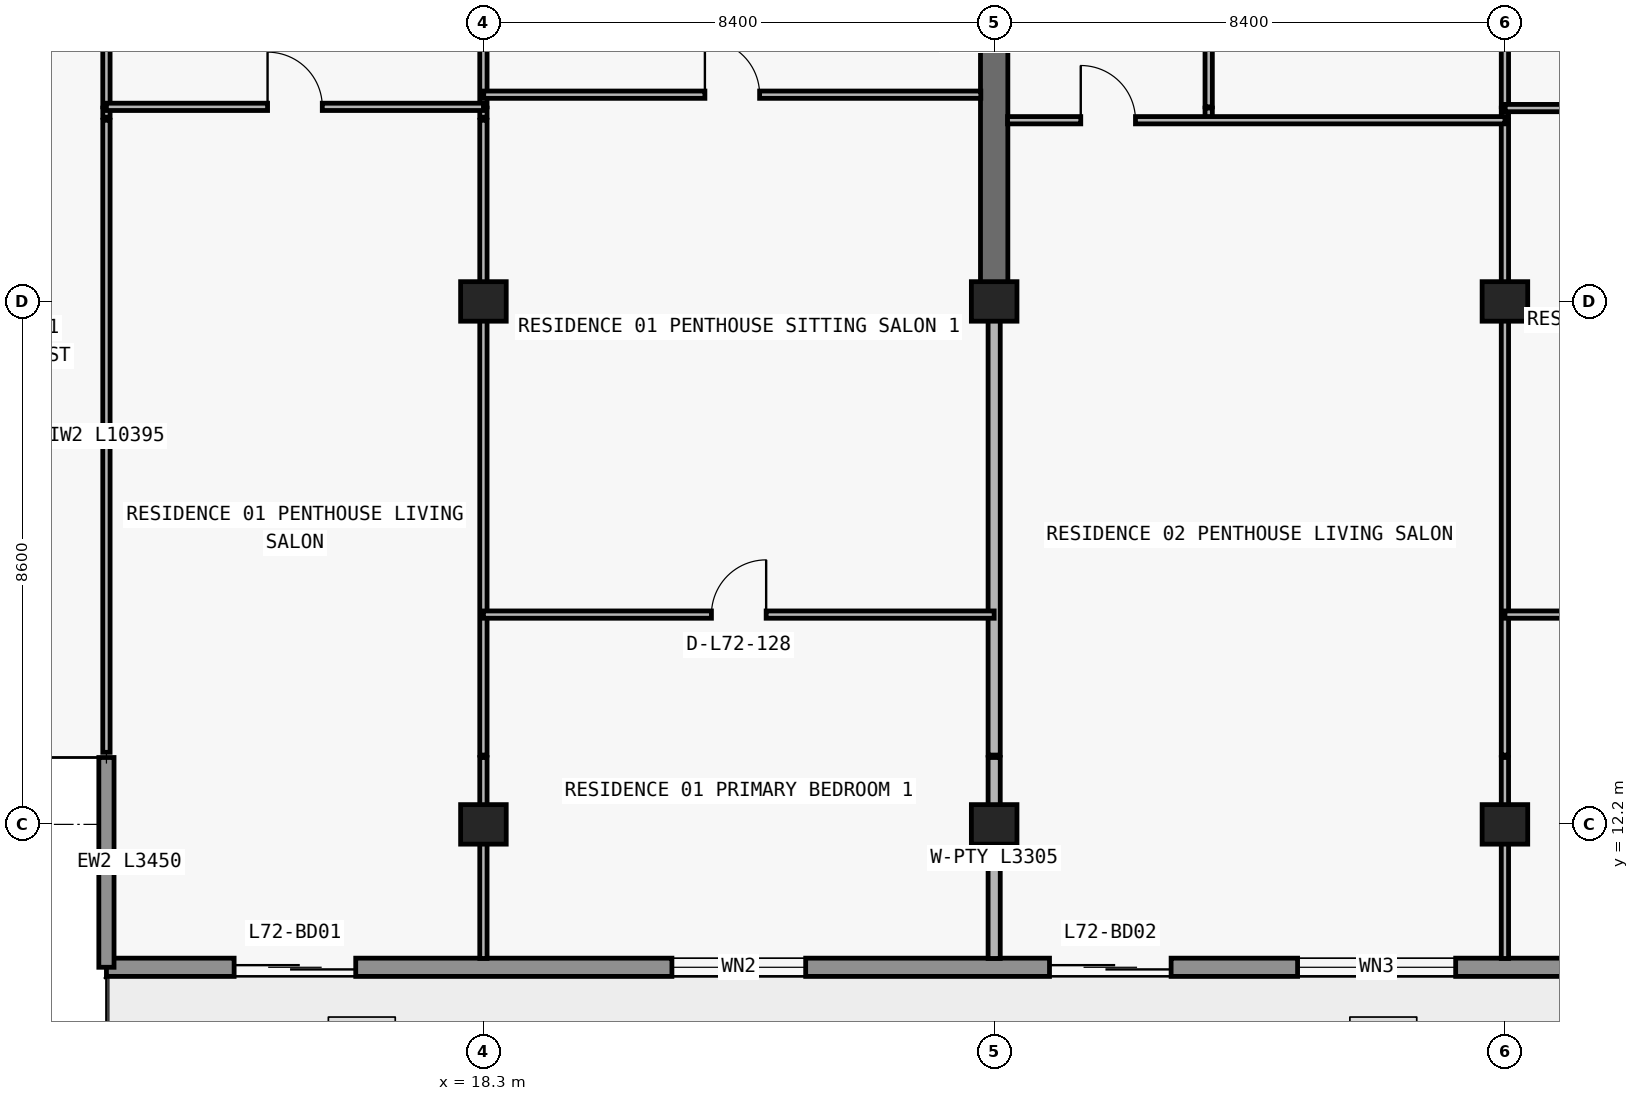
"""IFC4 building model, lengths in metres.
Left out: names, types, materials, properties, quantities, classifications, styles, units other than length and angle.
Written with IfcOpenShell. Run it as: python <this file> out.ifc"""

import sys

from ifc_helpers import new_model, si_unit, direction, frame, frame_2d, origin, origin_2d, place, context, subcontext, project, spatial, rectangle, extrude, element, fill, save


model = new_model("IFC4")
c1 = context("Model", 3, precision=1e-05, world=origin(), true_north=direction((0.0, 1.0)))
c2 = subcontext(c1, "Body", "Model", "MODEL_VIEW")
j1 = project(units=[si_unit("LENGTHUNIT", "METRE"), si_unit("PLANEANGLEUNIT", "RADIAN")], contexts=[c1])
p1 = place(None, origin())
s1 = spatial("IfcSite", under=j1, at=p1, CompositionType="ELEMENT")
p2 = place(p1, origin())
s2 = spatial("IfcBuilding", under=s1, at=p2, CompositionType="ELEMENT")
p3 = place(p2, frame((0.0, 0.0, 256.2)))
s3 = spatial("IfcBuildingStorey", under=s2, at=p3, CompositionType="ELEMENT", Elevation=256.2)
for number, where, z_axis, x_axis in (
    (1, (18.3, 12.2, 0.0), (0.0, 0.0, 1.0), (1.0, 0.0, 0.0)),
    (2, (26.7, 12.2, 0.0), (0.0, 0.0, 1.0), (1.0, 0.0, 0.0)),
    (3, (35.1, 12.2, 0.0), (0.0, 0.0, 1.0), (1.0, 0.0, 0.0)),
    (4, (18.3, 20.8, 0.0), (0.0, 0.0, 1.0), (1.0, 0.0, 0.0)),
    (5, (26.7, 20.8, 0.0), (0.0, 0.0, 1.0), (1.0, 0.0, 0.0)),
    (6, (35.1, 20.8, 0.0), (0.0, 0.0, 1.0), (1.0, 0.0, 0.0)),
):
    element("IfcColumn", number, at=place(p3, frame(where, z_axis=z_axis, x_axis=x_axis)), inside=s3, PredefinedType="COLUMN", context=c2, shape_type="SweptSolid", body=[
        extrude(rectangle(XDim=0.75, YDim=0.65, at=origin_2d()), origin(), (0.0, 0.0, 1.0), 3.05),
    ])
p4 = place(p3, frame((26.7, 20.8, 0.0), z_axis=(0.0, 0.0, 1.0), x_axis=(0.0, 1.0, 0.0)))
e7 = element("IfcWall", 7, at=p4, inside=s3, PredefinedType="SHEAR", context=c2, shape_type="SweptSolid", body=[
    extrude(rectangle(XDim=8.6, YDim=0.45, at=frame_2d((4.3, 0.0))), origin(), (0.0, 0.0, 1.0), 3.05),
])
p5 = place(p3, frame((65.7, 9.85, 0.0), z_axis=(0.0, 0.0, 1.0), x_axis=(-1.0, 0.0, 0.0)))
e8 = element("IfcWall", 8, at=p5, inside=s3, PredefinedType="STANDARD", context=c2, shape_type="SweptSolid", body=[
    extrude(rectangle(XDim=53.6, YDim=0.3, at=frame_2d((26.8, 0.0))), origin(), (0.0, 0.0, 1.0), 3.05),
])
p6 = place(p5, frame((49.5, 0.0, 0.0)))
e9 = element("IfcOpeningElement", 9, at=p6, cuts=e8, PredefinedType="OPENING", context=c2, shape_type="SweptSolid", body=[
    extrude(rectangle(XDim=2.0, YDim=2.3, at=frame_2d((1.0, 1.15))), frame((0.0, 0.16, 0.0), z_axis=(0.0, -1.0, 0.0), x_axis=(1.0, 0.0, 0.0)), (0.0, 0.0, 1.0), 0.32),
])
p7 = place(p5, frame((42.1, 0.0, 0.85)))
e10 = element("IfcOpeningElement", 10, at=p7, cuts=e8, PredefinedType="OPENING", context=c2, shape_type="SweptSolid", body=[
    extrude(rectangle(XDim=2.2, YDim=1.55, at=frame_2d((1.1, 0.775))), frame((0.0, 0.16, 0.0), z_axis=(0.0, -1.0, 0.0), x_axis=(1.0, 0.0, 0.0)), (0.0, 0.0, 1.0), 0.32),
])
p8 = place(p5, frame((36.09, 0.0, 0.0)))
e11 = element("IfcOpeningElement", 11, at=p8, cuts=e8, PredefinedType="OPENING", context=c2, shape_type="SweptSolid", body=[
    extrude(rectangle(XDim=2.0, YDim=2.3, at=frame_2d((1.0, 1.15))), frame((0.0, 0.16, 0.0), z_axis=(0.0, -1.0, 0.0), x_axis=(1.0, 0.0, 0.0)), (0.0, 0.0, 1.0), 0.32),
])
p9 = place(p5, frame((31.41, 0.0, 0.65)))
e12 = element("IfcOpeningElement", 12, at=p9, cuts=e8, PredefinedType="OPENING", context=c2, shape_type="SweptSolid", body=[
    extrude(rectangle(XDim=2.6, YDim=1.85, at=frame_2d((1.3, 0.925))), frame((0.0, 0.16, 0.0), z_axis=(0.0, -1.0, 0.0), x_axis=(1.0, 0.0, 0.0)), (0.0, 0.0, 1.0), 0.32),
])
p10 = place(p5, frame((25.7, 0.0, 0.85)))
e13 = element("IfcOpeningElement", 13, at=p10, cuts=e8, PredefinedType="OPENING", context=c2, shape_type="SweptSolid", body=[
    extrude(rectangle(XDim=2.2, YDim=1.55, at=frame_2d((1.1, 0.775))), frame((0.0, 0.16, 0.0), z_axis=(0.0, -1.0, 0.0), x_axis=(1.0, 0.0, 0.0)), (0.0, 0.0, 1.0), 0.32),
])
p11 = place(p5, frame((17.7, 0.0, 0.85)))
e14 = element("IfcOpeningElement", 14, at=p11, cuts=e8, PredefinedType="OPENING", context=c2, shape_type="SweptSolid", body=[
    extrude(rectangle(XDim=2.2, YDim=1.55, at=frame_2d((1.1, 0.775))), frame((0.0, 0.16, 0.0), z_axis=(0.0, -1.0, 0.0), x_axis=(1.0, 0.0, 0.0)), (0.0, 0.0, 1.0), 0.32),
])
p12 = place(p5, frame((11.626, 0.0, 0.0)))
e15 = element("IfcOpeningElement", 15, at=p12, cuts=e8, PredefinedType="OPENING", context=c2, shape_type="SweptSolid", body=[
    extrude(rectangle(XDim=2.0, YDim=2.3, at=frame_2d((1.0, 1.15))), frame((0.0, 0.16, 0.0), z_axis=(0.0, -1.0, 0.0), x_axis=(1.0, 0.0, 0.0)), (0.0, 0.0, 1.0), 0.32),
])
p13 = place(p5, frame((7.326, 0.0, 0.85)))
e16 = element("IfcOpeningElement", 16, at=p13, cuts=e8, PredefinedType="OPENING", context=c2, shape_type="SweptSolid", body=[
    extrude(rectangle(XDim=2.2, YDim=1.55, at=frame_2d((1.1, 0.775))), frame((0.0, 0.16, 0.0), z_axis=(0.0, -1.0, 0.0), x_axis=(1.0, 0.0, 0.0)), (0.0, 0.0, 1.0), 0.32),
])
p14 = place(p3, frame((12.1, 13.3, 0.0), z_axis=(0.0, 0.0, 1.0), x_axis=(0.0, -1.0, 0.0)))
e17 = element("IfcWall", 17, at=p14, inside=s3, PredefinedType="ELEMENTEDWALL", context=c2, shape_type="SweptSolid", body=[
    extrude(rectangle(XDim=3.45, YDim=0.25, at=frame_2d((1.725, 0.0))), origin(), (0.0, 0.0, 1.0), 3.05),
])
p15 = place(p3, frame((12.1, 13.385, 0.0), z_axis=(0.0, 0.0, 1.0), x_axis=(0.0, 1.0, 0.0)))
e18 = element("IfcWall", 18, at=p15, inside=s3, PredefinedType="PARTITIONING", context=c2, shape_type="SweptSolid", body=[
    extrude(rectangle(XDim=10.395, YDim=0.12, at=frame_2d((5.198, 0.0))), origin(), (0.0, 0.0, 1.0), 3.05),
])
p16 = place(p3, frame((12.1, 23.83, 0.0), z_axis=(0.0, 0.0, 1.0), x_axis=(0.0, 1.0, 0.0)))
e19 = element("IfcWall", 19, at=p16, inside=s3, PredefinedType="PARTITIONING", context=c2, shape_type="SweptSolid", body=[
    extrude(rectangle(XDim=0.15, YDim=0.12, at=frame_2d((0.075, 0.0))), origin(), (0.0, 0.0, 1.0), 3.05),
])
p17 = place(p3, frame((12.1, 24.0, 0.0), z_axis=(0.0, 0.0, 1.0), x_axis=(0.0, 1.0, 0.0)))
e20 = element("IfcWall", 20, at=p17, inside=s3, PredefinedType="PARTITIONING", context=c2, shape_type="SweptSolid", body=[
    extrude(rectangle(XDim=4.58, YDim=0.12, at=frame_2d((2.29, 0.0))), origin(), (0.0, 0.0, 1.0), 3.05),
])
p18 = place(p17, frame((1.84, 0.0, 0.0)))
e21 = element("IfcOpeningElement", 21, at=p18, cuts=e20, PredefinedType="OPENING", context=c2, shape_type="SweptSolid", body=[
    extrude(rectangle(XDim=0.9, YDim=2.15, at=frame_2d((0.45, 1.075))), frame((0.0, 0.07, 0.0), z_axis=(0.0, -1.0, 0.0), x_axis=(1.0, 0.0, 0.0)), (0.0, 0.0, 1.0), 0.14),
])
p19 = place(p3, frame((18.3, 9.995, 0.0), z_axis=(0.0, 0.0, 1.0), x_axis=(0.0, 1.0, 0.0)))
e22 = element("IfcWall", 22, at=p19, inside=s3, PredefinedType="PARTITIONING", context=c2, shape_type="SweptSolid", body=[
    extrude(rectangle(XDim=3.305, YDim=0.12, at=frame_2d((1.652, 0.0))), origin(), (0.0, 0.0, 1.0), 2.263),
])
p20 = place(p3, frame((18.3, 13.34, 0.0), z_axis=(0.0, 0.0, 1.0), x_axis=(0.0, 1.0, 0.0)))
e23 = element("IfcWall", 23, at=p20, inside=s3, PredefinedType="PARTITIONING", context=c2, shape_type="SweptSolid", body=[
    extrude(rectangle(XDim=10.44, YDim=0.12, at=frame_2d((5.22, 0.0))), origin(), (0.0, 0.0, 1.0), 2.263),
])
p21 = place(p3, frame((18.3, 23.83, 0.0), z_axis=(0.0, 0.0, 1.0), x_axis=(0.0, 1.0, 0.0)))
e24 = element("IfcWall", 24, at=p21, inside=s3, PredefinedType="PARTITIONING", context=c2, shape_type="SweptSolid", body=[
    extrude(rectangle(XDim=0.15, YDim=0.12, at=frame_2d((0.075, 0.0))), origin(), (0.0, 0.0, 1.0), 2.263),
])
p22 = place(p3, frame((18.3, 24.0, 0.0), z_axis=(0.0, 0.0, 1.0), x_axis=(0.0, 1.0, 0.0)))
e25 = element("IfcWall", 25, at=p22, inside=s3, PredefinedType="PARTITIONING", context=c2, shape_type="SweptSolid", body=[
    extrude(rectangle(XDim=4.58, YDim=0.12, at=frame_2d((2.29, 0.0))), origin(), (0.0, 0.0, 1.0), 2.263),
])
p23 = place(p22, frame((1.94, 0.0, 0.0)))
e26 = element("IfcOpeningElement", 26, at=p23, cuts=e25, PredefinedType="OPENING", context=c2, shape_type="SweptSolid", body=[
    extrude(rectangle(XDim=0.9, YDim=2.15, at=frame_2d((0.45, 1.075))), frame((0.0, 0.07, 0.0), z_axis=(0.0, -1.0, 0.0), x_axis=(1.0, 0.0, 0.0)), (0.0, 0.0, 1.0), 0.14),
])
p24 = place(p3, frame((26.7, 9.995, 0.0), z_axis=(0.0, 0.0, 1.0), x_axis=(0.0, 1.0, 0.0)))
e27 = element("IfcWall", 27, at=p24, inside=s3, PredefinedType="PARTITIONING", context=c2, shape_type="SweptSolid", body=[
    extrude(rectangle(XDim=3.305, YDim=0.2, at=frame_2d((1.652, 0.0))), origin(), (0.0, 0.0, 1.0), 2.263),
])
p25 = place(p3, frame((26.7, 13.34, 0.0), z_axis=(0.0, 0.0, 1.0), x_axis=(0.0, 1.0, 0.0)))
e28 = element("IfcWall", 28, at=p25, inside=s3, PredefinedType="PARTITIONING", context=c2, shape_type="SweptSolid", body=[
    extrude(rectangle(XDim=7.455, YDim=0.2, at=frame_2d((3.728, 0.0))), origin(), (0.0, 0.0, 1.0), 2.263),
])
p26 = place(p3, frame((30.228, 23.83, 0.0), z_axis=(0.0, 0.0, 1.0), x_axis=(0.0, 1.0, 0.0)))
e29 = element("IfcWall", 29, at=p26, inside=s3, PredefinedType="PARTITIONING", context=c2, shape_type="SweptSolid", body=[
    extrude(rectangle(XDim=0.15, YDim=0.12, at=frame_2d((0.075, 0.0))), origin(), (0.0, 0.0, 1.0), 3.05),
])
p27 = place(p3, frame((30.228, 24.0, 0.0), z_axis=(0.0, 0.0, 1.0), x_axis=(0.0, 1.0, 0.0)))
e30 = element("IfcWall", 30, at=p27, inside=s3, PredefinedType="PARTITIONING", context=c2, shape_type="SweptSolid", body=[
    extrude(rectangle(XDim=4.58, YDim=0.12, at=frame_2d((2.29, 0.0))), origin(), (0.0, 0.0, 1.0), 3.05),
])
p28 = place(p27, frame((1.84, 0.0, 0.0)))
e31 = element("IfcOpeningElement", 31, at=p28, cuts=e30, PredefinedType="OPENING", context=c2, shape_type="SweptSolid", body=[
    extrude(rectangle(XDim=0.9, YDim=2.15, at=frame_2d((0.45, 1.075))), frame((0.0, 0.07, 0.0), z_axis=(0.0, -1.0, 0.0), x_axis=(1.0, 0.0, 0.0)), (0.0, 0.0, 1.0), 0.14),
])
p29 = place(p3, frame((35.1, 9.995, 0.0), z_axis=(0.0, 0.0, 1.0), x_axis=(0.0, 1.0, 0.0)))
e32 = element("IfcWall", 32, at=p29, inside=s3, PredefinedType="PARTITIONING", context=c2, shape_type="SweptSolid", body=[
    extrude(rectangle(XDim=3.305, YDim=0.12, at=frame_2d((1.652, 0.0))), origin(), (0.0, 0.0, 1.0), 2.263),
])
p30 = place(p3, frame((35.1, 13.34, 0.0), z_axis=(0.0, 0.0, 1.0), x_axis=(0.0, 1.0, 0.0)))
e33 = element("IfcWall", 33, at=p30, inside=s3, PredefinedType="PARTITIONING", context=c2, shape_type="SweptSolid", body=[
    extrude(rectangle(XDim=10.44, YDim=0.12, at=frame_2d((5.22, 0.0))), origin(), (0.0, 0.0, 1.0), 2.263),
])
p31 = place(p3, frame((35.1, 23.83, 0.0), z_axis=(0.0, 0.0, 1.0), x_axis=(0.0, 1.0, 0.0)))
e34 = element("IfcWall", 34, at=p31, inside=s3, PredefinedType="PARTITIONING", context=c2, shape_type="SweptSolid", body=[
    extrude(rectangle(XDim=0.15, YDim=0.12, at=frame_2d((0.075, 0.0))), origin(), (0.0, 0.0, 1.0), 2.263),
])
p32 = place(p3, frame((35.1, 24.0, 0.0), z_axis=(0.0, 0.0, 1.0), x_axis=(0.0, 1.0, 0.0)))
e35 = element("IfcWall", 35, at=p32, inside=s3, PredefinedType="PARTITIONING", context=c2, shape_type="SweptSolid", body=[
    extrude(rectangle(XDim=4.58, YDim=0.12, at=frame_2d((2.29, 0.0))), origin(), (0.0, 0.0, 1.0), 2.263),
])
p33 = place(p32, frame((1.74, 0.0, 0.0)))
e36 = element("IfcOpeningElement", 36, at=p33, cuts=e35, PredefinedType="OPENING", context=c2, shape_type="SweptSolid", body=[
    extrude(rectangle(XDim=0.9, YDim=2.15, at=frame_2d((0.45, 1.075))), frame((0.0, 0.07, 0.0), z_axis=(0.0, -1.0, 0.0), x_axis=(1.0, 0.0, 0.0)), (0.0, 0.0, 1.0), 0.14),
])
p34 = place(p3, frame((18.3, 15.65, 0.0), z_axis=(0.0, 0.0, 1.0), x_axis=(1.0, 0.0, 0.0)))
e37 = element("IfcWall", 37, at=p34, inside=s3, PredefinedType="PARTITIONING", context=c2, shape_type="SweptSolid", body=[
    extrude(rectangle(XDim=8.4, YDim=0.12, at=frame_2d((4.2, 0.0))), origin(), (0.0, 0.0, 1.0), 3.05),
])
p35 = place(p34, frame((3.75, 0.0, 0.0)))
e38 = element("IfcOpeningElement", 38, at=p35, cuts=e37, PredefinedType="OPENING", context=c2, shape_type="SweptSolid", body=[
    extrude(rectangle(XDim=0.9, YDim=2.15, at=frame_2d((0.45, 1.075))), frame((0.0, 0.07, 0.0), z_axis=(0.0, -1.0, 0.0), x_axis=(1.0, 0.0, 0.0)), (0.0, 0.0, 1.0), 0.14),
])
p36 = place(p3, frame((35.1, 15.65, 0.0), z_axis=(0.0, 0.0, 1.0), x_axis=(1.0, 0.0, 0.0)))
e39 = element("IfcWall", 39, at=p36, inside=s3, PredefinedType="PARTITIONING", context=c2, shape_type="SweptSolid", body=[
    extrude(rectangle(XDim=16.0, YDim=0.12, at=frame_2d((8.0, 0.0))), origin(), (0.0, 0.0, 1.0), 3.05),
])
p37 = place(p36, frame((3.35, 0.0, 0.0)))
e40 = element("IfcOpeningElement", 40, at=p37, cuts=e39, PredefinedType="OPENING", context=c2, shape_type="SweptSolid", body=[
    extrude(rectangle(XDim=0.9, YDim=2.15, at=frame_2d((0.45, 1.075))), frame((0.0, 0.07, 0.0), z_axis=(0.0, -1.0, 0.0), x_axis=(1.0, 0.0, 0.0)), (0.0, 0.0, 1.0), 0.14),
])
p38 = place(p36, frame((11.35, 0.0, 0.0)))
e41 = element("IfcOpeningElement", 41, at=p38, cuts=e39, PredefinedType="OPENING", context=c2, shape_type="SweptSolid", body=[
    extrude(rectangle(XDim=0.9, YDim=2.15, at=frame_2d((0.45, 1.075))), frame((0.0, 0.07, 0.0), z_axis=(0.0, -1.0, 0.0), x_axis=(1.0, 0.0, 0.0)), (0.0, 0.0, 1.0), 0.14),
])
p39 = place(p3, frame((26.92, 23.78, 0.0), z_axis=(0.0, 0.0, 1.0), x_axis=(1.0, 0.0, 0.0)))
e42 = element("IfcWall", 42, at=p39, inside=s3, PredefinedType="PARTITIONING", context=c2, shape_type="SweptSolid", body=[
    extrude(rectangle(XDim=8.18, YDim=0.12, at=frame_2d((4.09, 0.0))), origin(), (0.0, 0.0, 1.0), 3.05),
])
p40 = place(p39, frame((1.204, 0.0, 0.0)))
e43 = element("IfcOpeningElement", 43, at=p40, cuts=e42, PredefinedType="OPENING", context=c2, shape_type="SweptSolid", body=[
    extrude(rectangle(XDim=0.9, YDim=2.15, at=frame_2d((0.45, 1.075))), frame((0.0, 0.07, 0.0), z_axis=(0.0, -1.0, 0.0), x_axis=(1.0, 0.0, 0.0)), (0.0, 0.0, 1.0), 0.14),
])
p41 = place(p3, frame((35.105, 23.98, 0.0), z_axis=(0.0, 0.0, 1.0), x_axis=(1.0, 0.0, 0.0)))
e44 = element("IfcWall", 44, at=p41, inside=s3, PredefinedType="PARTITIONING", context=c2, shape_type="SweptSolid", body=[
    extrude(rectangle(XDim=7.59, YDim=0.12, at=frame_2d((3.795, 0.0))), origin(), (0.0, 0.0, 1.0), 3.05),
])
p42 = place(p41, frame((3.345, 0.0, 0.0)))
e45 = element("IfcOpeningElement", 45, at=p42, cuts=e44, PredefinedType="OPENING", context=c2, shape_type="SweptSolid", body=[
    extrude(rectangle(XDim=0.9, YDim=2.15, at=frame_2d((0.45, 1.075))), frame((0.0, 0.07, 0.0), z_axis=(0.0, -1.0, 0.0), x_axis=(1.0, 0.0, 0.0)), (0.0, 0.0, 1.0), 0.14),
])
p43 = place(p3, frame((12.1, 24.0, 0.0), z_axis=(0.0, 0.0, 1.0), x_axis=(1.0, 0.0, 0.0)))
e46 = element("IfcWall", 46, at=p43, inside=s3, PredefinedType="PARTITIONING", context=c2, shape_type="SweptSolid", body=[
    extrude(rectangle(XDim=6.2, YDim=0.12, at=frame_2d((3.1, 0.0))), origin(), (0.0, 0.0, 1.0), 3.05),
])
p44 = place(p43, frame((2.65, 0.0, 0.0)))
e47 = element("IfcOpeningElement", 47, at=p44, cuts=e46, PredefinedType="OPENING", context=c2, shape_type="SweptSolid", body=[
    extrude(rectangle(XDim=0.9, YDim=2.15, at=frame_2d((0.45, 1.075))), frame((0.0, 0.07, 0.0), z_axis=(0.0, -1.0, 0.0), x_axis=(1.0, 0.0, 0.0)), (0.0, 0.0, 1.0), 0.14),
])
p45 = place(p3, frame((18.305, 24.2, 0.0), z_axis=(0.0, 0.0, 1.0), x_axis=(1.0, 0.0, 0.0)))
e48 = element("IfcWall", 48, at=p45, inside=s3, PredefinedType="PARTITIONING", context=c2, shape_type="SweptSolid", body=[
    extrude(rectangle(XDim=8.175, YDim=0.12, at=frame_2d((4.087, 0.0))), origin(), (0.0, 0.0, 1.0), 3.05),
])
p46 = place(p45, frame((3.637, 0.0, 0.0)))
e49 = element("IfcOpeningElement", 49, at=p46, cuts=e48, PredefinedType="OPENING", context=c2, shape_type="SweptSolid", body=[
    extrude(rectangle(XDim=0.9, YDim=2.15, at=frame_2d((0.45, 1.075))), frame((0.0, 0.07, 0.0), z_axis=(0.0, -1.0, 0.0), x_axis=(1.0, 0.0, 0.0)), (0.0, 0.0, 1.0), 0.14),
])
p47 = place(p6, origin())
e50 = element("IfcDoor", 50, at=p47, inside=s3, OperationType="DOUBLE_DOOR_SLIDING", PredefinedType="DOOR", context=c2, shape_type="SweptSolid", body=[
    extrude(rectangle(XDim=2.0, YDim=2.3, at=frame_2d((1.0, 1.15))), frame((0.0, 0.025, 0.0), z_axis=(0.0, -1.0, 0.0), x_axis=(1.0, 0.0, 0.0)), (0.0, 0.0, 1.0), 0.05),
])
fill(e9, e50)
p48 = place(p7, origin())
e51 = element("IfcWindow", 51, at=p48, inside=s3, PartitioningType="SINGLE_PANEL", PredefinedType="WINDOW", context=c2, shape_type="SweptSolid", body=[
    extrude(rectangle(XDim=2.2, YDim=1.55, at=frame_2d((1.1, 0.775))), frame((0.0, 0.03, 0.0), z_axis=(0.0, -1.0, 0.0), x_axis=(1.0, 0.0, 0.0)), (0.0, 0.0, 1.0), 0.06),
])
fill(e10, e51)
p49 = place(p8, origin())
e52 = element("IfcDoor", 52, at=p49, inside=s3, OperationType="DOUBLE_DOOR_SLIDING", PredefinedType="DOOR", context=c2, shape_type="SweptSolid", body=[
    extrude(rectangle(XDim=2.0, YDim=2.3, at=frame_2d((1.0, 1.15))), frame((0.0, 0.025, 0.0), z_axis=(0.0, -1.0, 0.0), x_axis=(1.0, 0.0, 0.0)), (0.0, 0.0, 1.0), 0.05),
])
fill(e11, e52)
p50 = place(p9, origin())
e53 = element("IfcWindow", 53, at=p50, inside=s3, PartitioningType="SINGLE_PANEL", PredefinedType="WINDOW", context=c2, shape_type="SweptSolid", body=[
    extrude(rectangle(XDim=2.6, YDim=1.85, at=frame_2d((1.3, 0.925))), frame((0.0, 0.03, 0.0), z_axis=(0.0, -1.0, 0.0), x_axis=(1.0, 0.0, 0.0)), (0.0, 0.0, 1.0), 0.06),
])
fill(e12, e53)
p51 = place(p44, origin())
e54 = element("IfcDoor", 54, at=p51, inside=s3, OperationType="SINGLE_SWING_LEFT", PredefinedType="DOOR", context=c2, shape_type="SweptSolid", body=[
    extrude(rectangle(XDim=0.9, YDim=2.15, at=frame_2d((0.45, 1.075))), frame((0.0, 0.025, 0.0), z_axis=(0.0, -1.0, 0.0), x_axis=(1.0, 0.0, 0.0)), (0.0, 0.0, 1.0), 0.05),
])
fill(e47, e54)
p52 = place(p46, origin())
e55 = element("IfcDoor", 55, at=p52, inside=s3, OperationType="SINGLE_SWING_LEFT", PredefinedType="DOOR", context=c2, shape_type="SweptSolid", body=[
    extrude(rectangle(XDim=0.9, YDim=2.15, at=frame_2d((0.45, 1.075))), frame((0.0, 0.025, 0.0), z_axis=(0.0, -1.0, 0.0), x_axis=(1.0, 0.0, 0.0)), (0.0, 0.0, 1.0), 0.05),
])
fill(e49, e55)
p53 = place(p35, origin())
e56 = element("IfcDoor", 56, at=p53, inside=s3, OperationType="SINGLE_SWING_RIGHT", PredefinedType="DOOR", context=c2, shape_type="SweptSolid", body=[
    extrude(rectangle(XDim=0.9, YDim=2.15, at=frame_2d((0.45, 1.075))), frame((0.0, 0.025, 0.0), z_axis=(0.0, -1.0, 0.0), x_axis=(1.0, 0.0, 0.0)), (0.0, 0.0, 1.0), 0.05),
])
fill(e38, e56)
p54 = place(p40, origin())
e57 = element("IfcDoor", 57, at=p54, inside=s3, OperationType="SINGLE_SWING_LEFT", PredefinedType="DOOR", context=c2, shape_type="SweptSolid", body=[
    extrude(rectangle(XDim=0.9, YDim=2.15, at=frame_2d((0.45, 1.075))), frame((0.0, 0.025, 0.0), z_axis=(0.0, -1.0, 0.0), x_axis=(1.0, 0.0, 0.0)), (0.0, 0.0, 1.0), 0.05),
])
fill(e43, e57)
save(model, sys.argv[1])
